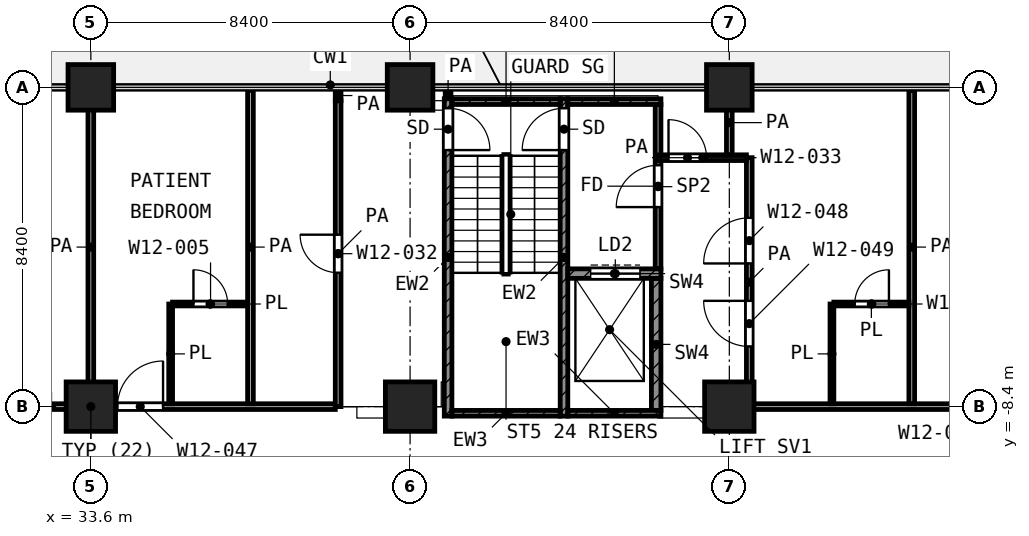
"""IFC4 building model, lengths in metres.
Left out: names, types, materials, properties, quantities, classifications, styles, units other than length and angle.
Written with IfcOpenShell. Run it as: python <this file> out.ifc"""

import sys

from ifc_helpers import new_model, si_unit, direction, frame, frame_2d, origin, origin_2d, place, context, subcontext, project, spatial, rectangle, extrude, element, fill, save


model = new_model("IFC4")
c1 = context("Model", 3, precision=1e-05, world=origin(), true_north=direction((0.0, 1.0)))
c2 = subcontext(c1, "Body", "Model", "MODEL_VIEW")
j1 = project(units=[si_unit("LENGTHUNIT", "METRE"), si_unit("PLANEANGLEUNIT", "RADIAN")], contexts=[c1])
p1 = place(None, origin())
s1 = spatial("IfcSite", under=j1, at=p1, CompositionType="ELEMENT")
p2 = place(p1, origin())
s2 = spatial("IfcBuilding", under=s1, at=p2, CompositionType="ELEMENT")
p3 = place(p2, frame((0.0, 0.0, 56.0)))
s3 = spatial("IfcBuildingStorey", under=s2, at=p3, CompositionType="ELEMENT", Elevation=56.0)
for number, where, z_axis, x_axis in (
    (1, (33.6, 0.0, 0.0), (0.0, 0.0, 1.0), (1.0, 0.0, 0.0)),
    (2, (42.0, 0.0, 0.0), (0.0, 0.0, 1.0), (1.0, 0.0, 0.0)),
    (3, (50.4, 0.0, 0.0), (0.0, 0.0, 1.0), (1.0, 0.0, 0.0)),
):
    element("IfcColumn", number, at=place(p3, frame(where, z_axis=z_axis, x_axis=x_axis)), inside=s3, PredefinedType="COLUMN", context=c2, shape_type="SweptSolid", body=[
        extrude(rectangle(XDim=1.2, YDim=1.2, at=origin_2d()), origin(), (0.0, 0.0, 1.0), 4.2),
    ])
for number, where, z_axis, x_axis in (
    (4, (33.6, -8.4, 0.0), (0.0, 0.0, 1.0), (1.0, 0.0, 0.0)),
    (5, (42.0, -8.4, 0.0), (0.0, 0.0, 1.0), (1.0, 0.0, 0.0)),
    (6, (50.4, -8.4, 0.0), (0.0, 0.0, 1.0), (1.0, 0.0, 0.0)),
):
    element("IfcColumn", number, at=place(p3, frame(where, z_axis=z_axis, x_axis=x_axis)), inside=s3, PredefinedType="COLUMN", context=c2, shape_type="SweptSolid", body=[
        extrude(rectangle(XDim=1.3, YDim=1.3, at=origin_2d()), origin(), (0.0, 0.0, 1.0), 4.2),
    ])
p4 = place(p3, frame((43.0, -8.65, 0.0), z_axis=(0.0, 0.0, 1.0), x_axis=(0.0, 1.0, 0.0)))
e7 = element("IfcWall", 7, at=p4, inside=s3, PredefinedType="SHEAR", context=c2, shape_type="SweptSolid", body=[
    extrude(rectangle(XDim=8.35, YDim=0.2, at=frame_2d((4.175, 0.0))), origin(), (0.0, 0.0, 1.0), 3.9),
])
p5 = place(p4, frame((7.0, 0.0, 0.0)))
e8 = element("IfcOpeningElement", 8, at=p5, cuts=e7, PredefinedType="OPENING", context=c2, shape_type="SweptSolid", body=[
    extrude(rectangle(XDim=1.1, YDim=2.1, at=frame_2d((0.55, 1.05))), frame((0.0, 0.11, 0.0), z_axis=(0.0, -1.0, 0.0), x_axis=(1.0, 0.0, 0.0)), (0.0, 0.0, 1.0), 0.22),
])
p6 = place(p3, frame((46.05, -8.65, 0.0), z_axis=(0.0, 0.0, 1.0), x_axis=(0.0, 1.0, 0.0)))
e9 = element("IfcWall", 9, at=p6, inside=s3, PredefinedType="SHEAR", context=c2, shape_type="SweptSolid", body=[
    extrude(rectangle(XDim=8.35, YDim=0.2, at=frame_2d((4.175, 0.0))), origin(), (0.0, 0.0, 1.0), 3.9),
])
p7 = place(p6, frame((7.0, 0.0, 0.0)))
e10 = element("IfcOpeningElement", 10, at=p7, cuts=e9, PredefinedType="OPENING", context=c2, shape_type="SweptSolid", body=[
    extrude(rectangle(XDim=1.1, YDim=2.1, at=frame_2d((0.55, 1.05))), frame((0.0, 0.11, 0.0), z_axis=(0.0, -1.0, 0.0), x_axis=(1.0, 0.0, 0.0)), (0.0, 0.0, 1.0), 0.22),
])
p8 = place(p3, frame((43.1, -0.375, 0.0), z_axis=(0.0, 0.0, 1.0), x_axis=(1.0, 0.0, 0.0)))
e11 = element("IfcWall", 11, at=p8, inside=s3, PredefinedType="SHEAR", context=c2, shape_type="SweptSolid", body=[
    extrude(rectangle(XDim=2.85, YDim=0.15, at=frame_2d((1.425, 0.0))), origin(), (0.0, 0.0, 1.0), 3.9),
])
p9 = place(p3, frame((46.15, -0.375, 0.0), z_axis=(0.0, 0.0, 1.0), x_axis=(1.0, 0.0, 0.0)))
e12 = element("IfcWall", 12, at=p9, inside=s3, PredefinedType="SHEAR", context=c2, shape_type="SweptSolid", body=[
    extrude(rectangle(XDim=2.45, YDim=0.15, at=frame_2d((1.225, 0.0))), origin(), (0.0, 0.0, 1.0), 3.9),
])
p10 = place(p3, frame((43.1, -8.575, 0.0), z_axis=(0.0, 0.0, 1.0), x_axis=(1.0, 0.0, 0.0)))
e13 = element("IfcWall", 13, at=p10, inside=s3, PredefinedType="SHEAR", context=c2, shape_type="SweptSolid", body=[
    extrude(rectangle(XDim=2.85, YDim=0.15, at=frame_2d((1.425, 0.0))), origin(), (0.0, 0.0, 1.0), 3.9),
])
p11 = place(p3, frame((46.15, -8.575, 0.0), z_axis=(0.0, 0.0, 1.0), x_axis=(1.0, 0.0, 0.0)))
e14 = element("IfcWall", 14, at=p11, inside=s3, PredefinedType="SHEAR", context=c2, shape_type="SweptSolid", body=[
    extrude(rectangle(XDim=2.45, YDim=0.15, at=frame_2d((1.225, 0.0))), origin(), (0.0, 0.0, 1.0), 3.9),
])
p12 = place(p3, frame((46.15, -4.9, 0.0), z_axis=(0.0, 0.0, 1.0), x_axis=(1.0, 0.0, 0.0)))
e15 = element("IfcWall", 15, at=p12, inside=s3, PredefinedType="SHEAR", context=c2, shape_type="SweptSolid", body=[
    extrude(rectangle(XDim=2.45, YDim=0.25, at=frame_2d((1.225, 0.0))), origin(), (0.0, 0.0, 1.0), 3.9),
])
p13 = place(p12, frame((0.6, 0.0, 0.0)))
e16 = element("IfcOpeningElement", 16, at=p13, cuts=e15, PredefinedType="OPENING", context=c2, shape_type="SweptSolid", body=[
    extrude(rectangle(XDim=1.3, YDim=2.1, at=frame_2d((0.65, 1.05))), frame((0.0, 0.135, 0.0), z_axis=(0.0, -1.0, 0.0), x_axis=(1.0, 0.0, 0.0)), (0.0, 0.0, 1.0), 0.27),
])
p14 = place(p3, frame((48.475, -8.5, 0.0), z_axis=(0.0, 0.0, 1.0), x_axis=(0.0, 1.0, 0.0)))
e17 = element("IfcWall", 17, at=p14, inside=s3, PredefinedType="SHEAR", context=c2, shape_type="SweptSolid", body=[
    extrude(rectangle(XDim=3.475, YDim=0.25, at=frame_2d((1.738, 0.0))), origin(), (0.0, 0.0, 1.0), 3.9),
])
p15 = place(p3, frame((48.525, -4.775, 0.0), z_axis=(0.0, 0.0, 1.0), x_axis=(0.0, 1.0, 0.0)))
e18 = element("IfcWall", 18, at=p15, inside=s3, PredefinedType="PARTITIONING", context=c2, shape_type="SweptSolid", body=[
    extrude(rectangle(XDim=4.325, YDim=0.15, at=frame_2d((2.163, 0.0))), origin(), (0.0, 0.0, 1.0), 3.9),
])
p16 = place(p15, frame((1.625, 0.0, 0.0)))
e19 = element("IfcOpeningElement", 19, at=p16, cuts=e18, PredefinedType="OPENING", context=c2, shape_type="SweptSolid", body=[
    extrude(rectangle(XDim=1.1, YDim=2.1, at=frame_2d((0.55, 1.05))), frame((0.0, 0.085, 0.0), z_axis=(0.0, -1.0, 0.0), x_axis=(1.0, 0.0, 0.0)), (0.0, 0.0, 1.0), 0.17),
])
p17 = place(p3, frame((35.75, -5.7, 0.0), z_axis=(0.0, 0.0, 1.0), x_axis=(1.0, 0.0, 0.0)))
e20 = element("IfcWall", 20, at=p17, inside=s3, PredefinedType="PARTITIONING", context=c2, shape_type="SweptSolid", body=[
    extrude(rectangle(XDim=1.975, YDim=0.1, at=frame_2d((0.988, 0.0))), origin(), (0.0, 0.0, 1.0), 3.9),
])
p18 = place(p17, frame((0.55, 0.0, 0.0)))
e21 = element("IfcOpeningElement", 21, at=p18, cuts=e20, PredefinedType="OPENING", context=c2, shape_type="SweptSolid", body=[
    extrude(rectangle(XDim=0.9, YDim=2.1, at=frame_2d((0.45, 1.05))), frame((0.0, 0.06, 0.0), z_axis=(0.0, -1.0, 0.0), x_axis=(1.0, 0.0, 0.0)), (0.0, 0.0, 1.0), 0.12),
])
p19 = place(p3, frame((53.15, -5.7, 0.0), z_axis=(0.0, 0.0, 1.0), x_axis=(1.0, 0.0, 0.0)))
e22 = element("IfcWall", 22, at=p19, inside=s3, PredefinedType="PARTITIONING", context=c2, shape_type="SweptSolid", body=[
    extrude(rectangle(XDim=1.975, YDim=0.1, at=frame_2d((0.988, 0.0))), origin(), (0.0, 0.0, 1.0), 3.9),
])
p20 = place(p19, frame((0.55, 0.0, 0.0)))
e23 = element("IfcOpeningElement", 23, at=p20, cuts=e22, PredefinedType="OPENING", context=c2, shape_type="SweptSolid", body=[
    extrude(rectangle(XDim=0.9, YDim=2.1, at=frame_2d((0.45, 1.05))), frame((0.0, 0.06, 0.0), z_axis=(0.0, -1.0, 0.0), x_axis=(1.0, 0.0, 0.0)), (0.0, 0.0, 1.0), 0.12),
])
for number, where, z_axis, x_axis in (
    (24, (35.7, -8.325, 0.0), (0.0, 0.0, 1.0), (0.0, 1.0, 0.0)),
    (25, (53.1, -8.325, 0.0), (0.0, 0.0, 1.0), (0.0, 1.0, 0.0)),
):
    element("IfcWall", number, at=place(p3, frame(where, z_axis=z_axis, x_axis=x_axis)), inside=s3, PredefinedType="PARTITIONING", context=c2, shape_type="SweptSolid", body=[
        extrude(rectangle(XDim=2.625, YDim=0.1, at=frame_2d((1.312, 0.0))), origin(), (0.0, 0.0, 1.0), 3.9),
    ])
p21 = place(p3, frame((25.1, -8.4, 0.0), z_axis=(0.0, 0.0, 1.0), x_axis=(1.0, 0.0, 0.0)))
e26 = element("IfcWall", 26, at=p21, inside=s3, PredefinedType="PARTITIONING", context=c2, shape_type="SweptSolid", body=[
    extrude(rectangle(XDim=14.932, YDim=0.15, at=frame_2d((7.466, 0.0))), origin(), (0.0, 0.0, 1.0), 3.9),
])
p22 = place(p21, frame((3.55, 0.0, 0.0)))
e27 = element("IfcOpeningElement", 27, at=p22, cuts=e26, PredefinedType="OPENING", context=c2, shape_type="SweptSolid", body=[
    extrude(rectangle(XDim=1.5, YDim=2.1, at=frame_2d((0.75, 1.05))), frame((0.0, 0.085, 0.0), z_axis=(0.0, -1.0, 0.0), x_axis=(1.0, 0.0, 0.0)), (0.0, 0.0, 1.0), 0.17),
])
p23 = place(p21, frame((9.2, 0.0, 0.0)))
e28 = element("IfcOpeningElement", 28, at=p23, cuts=e26, PredefinedType="OPENING", context=c2, shape_type="SweptSolid", body=[
    extrude(rectangle(XDim=1.2, YDim=2.1, at=frame_2d((0.6, 1.05))), frame((0.0, 0.085, 0.0), z_axis=(0.0, -1.0, 0.0), x_axis=(1.0, 0.0, 0.0)), (0.0, 0.0, 1.0), 0.17),
])
p24 = place(p3, frame((51.0, -8.4, 0.0), z_axis=(0.0, 0.0, 1.0), x_axis=(1.0, 0.0, 0.0)))
e29 = element("IfcWall", 29, at=p24, inside=s3, PredefinedType="PARTITIONING", context=c2, shape_type="SweptSolid", body=[
    extrude(rectangle(XDim=23.95, YDim=0.15, at=frame_2d((11.975, 0.0))), origin(), (0.0, 0.0, 1.0), 3.9),
])
p25 = place(p24, frame((5.4, 0.0, 0.0)))
e30 = element("IfcOpeningElement", 30, at=p25, cuts=e29, PredefinedType="OPENING", context=c2, shape_type="SweptSolid", body=[
    extrude(rectangle(XDim=1.2, YDim=2.1, at=frame_2d((0.6, 1.05))), frame((0.0, 0.085, 0.0), z_axis=(0.0, -1.0, 0.0), x_axis=(1.0, 0.0, 0.0)), (0.0, 0.0, 1.0), 0.17),
])
p26 = place(p24, frame((8.5, 0.0, 0.0)))
e31 = element("IfcOpeningElement", 31, at=p26, cuts=e29, PredefinedType="OPENING", context=c2, shape_type="SweptSolid", body=[
    extrude(rectangle(XDim=0.9, YDim=2.1, at=frame_2d((0.45, 1.05))), frame((0.0, 0.085, 0.0), z_axis=(0.0, -1.0, 0.0), x_axis=(1.0, 0.0, 0.0)), (0.0, 0.0, 1.0), 0.17),
])
p27 = place(p24, frame((14.0, 0.0, 0.0)))
e32 = element("IfcOpeningElement", 32, at=p27, cuts=e29, PredefinedType="OPENING", context=c2, shape_type="SweptSolid", body=[
    extrude(rectangle(XDim=1.2, YDim=2.1, at=frame_2d((0.6, 1.05))), frame((0.0, 0.085, 0.0), z_axis=(0.0, -1.0, 0.0), x_axis=(1.0, 0.0, 0.0)), (0.0, 0.0, 1.0), 0.17),
])
p28 = place(p24, frame((16.9, 0.0, 0.0)))
e33 = element("IfcOpeningElement", 33, at=p28, cuts=e29, PredefinedType="OPENING", context=c2, shape_type="SweptSolid", body=[
    extrude(rectangle(XDim=1.2, YDim=2.1, at=frame_2d((0.6, 1.05))), frame((0.0, 0.085, 0.0), z_axis=(0.0, -1.0, 0.0), x_axis=(1.0, 0.0, 0.0)), (0.0, 0.0, 1.0), 0.17),
])
p29 = place(p24, frame((21.825, 0.0, 0.0)))
e34 = element("IfcOpeningElement", 34, at=p29, cuts=e29, PredefinedType="OPENING", context=c2, shape_type="SweptSolid", body=[
    extrude(rectangle(XDim=1.0, YDim=2.1, at=frame_2d((0.5, 1.05))), frame((0.0, 0.085, 0.0), z_axis=(0.0, -1.0, 0.0), x_axis=(1.0, 0.0, 0.0)), (0.0, 0.0, 1.0), 0.17),
])
p30 = place(p3, frame((48.55, -1.85, 0.0), z_axis=(0.0, 0.0, 1.0), x_axis=(1.0, 0.0, 0.0)))
e35 = element("IfcWall", 35, at=p30, inside=s3, PredefinedType="PARTITIONING", context=c2, shape_type="SweptSolid", body=[
    extrude(rectangle(XDim=2.3, YDim=0.15, at=frame_2d((1.15, 0.0))), origin(), (0.0, 0.0, 1.0), 3.9),
])
p31 = place(p30, frame((0.25, 0.0, 0.0)))
e36 = element("IfcOpeningElement", 36, at=p31, cuts=e35, PredefinedType="OPENING", context=c2, shape_type="SweptSolid", body=[
    extrude(rectangle(XDim=1.0, YDim=2.1, at=frame_2d((0.5, 1.05))), frame((0.0, 0.085, 0.0), z_axis=(0.0, -1.0, 0.0), x_axis=(1.0, 0.0, 0.0)), (0.0, 0.0, 1.0), 0.17),
])
for number, where, z_axis, x_axis in (
    (37, (33.6, -8.325, 0.0), (0.0, 0.0, 1.0), (0.0, 1.0, 0.0)),
    (38, (37.8, -8.325, 0.0), (0.0, 0.0, 1.0), (0.0, 1.0, 0.0)),
):
    element("IfcWall", number, at=place(p3, frame(where, z_axis=z_axis, x_axis=x_axis)), inside=s3, PredefinedType="PARTITIONING", context=c2, shape_type="SweptSolid", body=[
        extrude(rectangle(XDim=8.245, YDim=0.15, at=frame_2d((4.123, 0.0))), origin(), (0.0, 0.0, 1.0), 3.9),
    ])
p32 = place(p3, frame((40.107, -8.4, 0.0), z_axis=(0.0, 0.0, 1.0), x_axis=(0.0, 1.0, 0.0)))
e39 = element("IfcWall", 39, at=p32, inside=s3, PredefinedType="PARTITIONING", context=c2, shape_type="SweptSolid", body=[
    extrude(rectangle(XDim=8.048, YDim=0.15, at=frame_2d((4.024, 0.0))), origin(), (0.0, 0.0, 1.0), 3.9),
])
p33 = place(p32, frame((3.524, 0.0, 0.0)))
e40 = element("IfcOpeningElement", 40, at=p33, cuts=e39, PredefinedType="OPENING", context=c2, shape_type="SweptSolid", body=[
    extrude(rectangle(XDim=1.0, YDim=2.1, at=frame_2d((0.5, 1.05))), frame((0.0, 0.085, 0.0), z_axis=(0.0, -1.0, 0.0), x_axis=(1.0, 0.0, 0.0)), (0.0, 0.0, 1.0), 0.17),
])
p34 = place(p3, frame((40.107, -0.35, 0.0), z_axis=(0.0, 0.0, 1.0), x_axis=(0.0, 1.0, 0.0)))
e41 = element("IfcWall", 41, at=p34, inside=s3, PredefinedType="PARTITIONING", context=c2, shape_type="SweptSolid", body=[
    extrude(rectangle(XDim=0.27, YDim=0.15, at=frame_2d((0.135, 0.0))), origin(), (0.0, 0.0, 1.0), 3.9),
])
p35 = place(p3, frame((43.0, -0.27, 0.0), z_axis=(0.0, 0.0, 1.0), x_axis=(0.0, 1.0, 0.0)))
e42 = element("IfcWall", 42, at=p35, inside=s3, PredefinedType="PARTITIONING", context=c2, shape_type="SweptSolid", body=[
    extrude(rectangle(XDim=0.19, YDim=0.15, at=frame_2d((0.095, 0.0))), origin(), (0.0, 0.0, 1.0), 3.9),
])
p36 = place(p3, frame((50.4, -1.775, 0.0), z_axis=(0.0, 0.0, 1.0), x_axis=(0.0, 1.0, 0.0)))
e43 = element("IfcWall", 43, at=p36, inside=s3, PredefinedType="PARTITIONING", context=c2, shape_type="SweptSolid", body=[
    extrude(rectangle(XDim=1.695, YDim=0.15, at=frame_2d((0.847, 0.0))), origin(), (0.0, 0.0, 1.0), 3.9),
])
p37 = place(p3, frame((50.925, -8.4, 0.0), z_axis=(0.0, 0.0, 1.0), x_axis=(0.0, 1.0, 0.0)))
e44 = element("IfcWall", 44, at=p37, inside=s3, PredefinedType="PARTITIONING", context=c2, shape_type="SweptSolid", body=[
    extrude(rectangle(XDim=6.55, YDim=0.15, at=frame_2d((3.275, 0.0))), origin(), (0.0, 0.0, 1.0), 3.9),
])
p38 = place(p37, frame((3.767, 0.0, 0.0)))
e45 = element("IfcOpeningElement", 45, at=p38, cuts=e44, PredefinedType="OPENING", context=c2, shape_type="SweptSolid", body=[
    extrude(rectangle(XDim=1.2, YDim=2.1, at=frame_2d((0.6, 1.05))), frame((0.0, 0.085, 0.0), z_axis=(0.0, -1.0, 0.0), x_axis=(1.0, 0.0, 0.0)), (0.0, 0.0, 1.0), 0.17),
])
p39 = place(p37, frame((1.583, 0.0, 0.0)))
e46 = element("IfcOpeningElement", 46, at=p39, cuts=e44, PredefinedType="OPENING", context=c2, shape_type="SweptSolid", body=[
    extrude(rectangle(XDim=1.2, YDim=2.1, at=frame_2d((0.6, 1.05))), frame((0.0, 0.085, 0.0), z_axis=(0.0, -1.0, 0.0), x_axis=(1.0, 0.0, 0.0)), (0.0, 0.0, 1.0), 0.17),
])
p40 = place(p3, frame((55.2, -8.325, 0.0), z_axis=(0.0, 0.0, 1.0), x_axis=(0.0, 1.0, 0.0)))
e47 = element("IfcWall", 47, at=p40, inside=s3, PredefinedType="PARTITIONING", context=c2, shape_type="SweptSolid", body=[
    extrude(rectangle(XDim=8.245, YDim=0.15, at=frame_2d((4.123, 0.0))), origin(), (0.0, 0.0, 1.0), 3.9),
])
p41 = place(p5, frame((1.1, 0.0, 0.0), z_axis=(0.0, 0.0, 1.0), x_axis=(-1.0, 0.0, 0.0)))
e48 = element("IfcDoor", 48, at=p41, inside=s3, OperationType="SINGLE_SWING_LEFT", PredefinedType="DOOR", context=c2, shape_type="SweptSolid", body=[
    extrude(rectangle(XDim=1.1, YDim=2.1, at=frame_2d((0.55, 1.05))), frame((0.0, 0.025, 0.0), z_axis=(0.0, -1.0, 0.0), x_axis=(1.0, 0.0, 0.0)), (0.0, 0.0, 1.0), 0.05),
])
fill(e8, e48)
p42 = place(p7, origin())
e49 = element("IfcDoor", 49, at=p42, inside=s3, OperationType="SINGLE_SWING_LEFT", PredefinedType="DOOR", context=c2, shape_type="SweptSolid", body=[
    extrude(rectangle(XDim=1.1, YDim=2.1, at=frame_2d((0.55, 1.05))), frame((0.0, 0.025, 0.0), z_axis=(0.0, -1.0, 0.0), x_axis=(1.0, 0.0, 0.0)), (0.0, 0.0, 1.0), 0.05),
])
fill(e10, e49)
p43 = place(p13, origin())
e50 = element("IfcDoor", 50, at=p43, inside=s3, OperationType="DOUBLE_DOOR_SLIDING", PredefinedType="DOOR", context=c2, shape_type="SweptSolid", body=[
    extrude(rectangle(XDim=1.3, YDim=2.1, at=frame_2d((0.65, 1.05))), frame((0.0, 0.025, 0.0), z_axis=(0.0, -1.0, 0.0), x_axis=(1.0, 0.0, 0.0)), (0.0, 0.0, 1.0), 0.05),
])
fill(e16, e50)
p44 = place(p16, origin())
e51 = element("IfcDoor", 51, at=p44, inside=s3, OperationType="SINGLE_SWING_LEFT", PredefinedType="DOOR", context=c2, shape_type="SweptSolid", body=[
    extrude(rectangle(XDim=1.1, YDim=2.1, at=frame_2d((0.55, 1.05))), frame((0.0, 0.025, 0.0), z_axis=(0.0, -1.0, 0.0), x_axis=(1.0, 0.0, 0.0)), (0.0, 0.0, 1.0), 0.05),
])
fill(e19, e51)
p45 = place(p23, origin())
e52 = element("IfcDoor", 52, at=p45, inside=s3, OperationType="SINGLE_SWING_RIGHT", PredefinedType="DOOR", context=c2, shape_type="SweptSolid", body=[
    extrude(rectangle(XDim=1.2, YDim=2.1, at=frame_2d((0.6, 1.05))), frame((0.0, 0.025, 0.0), z_axis=(0.0, -1.0, 0.0), x_axis=(1.0, 0.0, 0.0)), (0.0, 0.0, 1.0), 0.05),
])
fill(e28, e52)
p46 = place(p18, origin())
e53 = element("IfcDoor", 53, at=p46, inside=s3, OperationType="SINGLE_SWING_LEFT", PredefinedType="DOOR", context=c2, shape_type="SweptSolid", body=[
    extrude(rectangle(XDim=0.9, YDim=2.1, at=frame_2d((0.45, 1.05))), frame((0.0, 0.025, 0.0), z_axis=(0.0, -1.0, 0.0), x_axis=(1.0, 0.0, 0.0)), (0.0, 0.0, 1.0), 0.05),
])
fill(e21, e53)
p47 = place(p33, origin())
e54 = element("IfcDoor", 54, at=p47, inside=s3, OperationType="SINGLE_SWING_RIGHT", PredefinedType="DOOR", context=c2, shape_type="SweptSolid", body=[
    extrude(rectangle(XDim=1.0, YDim=2.1, at=frame_2d((0.5, 1.05))), frame((0.0, 0.025, 0.0), z_axis=(0.0, -1.0, 0.0), x_axis=(1.0, 0.0, 0.0)), (0.0, 0.0, 1.0), 0.05),
])
fill(e40, e54)
p48 = place(p31, origin())
e55 = element("IfcDoor", 55, at=p48, inside=s3, OperationType="SINGLE_SWING_LEFT", PredefinedType="DOOR", context=c2, shape_type="SweptSolid", body=[
    extrude(rectangle(XDim=1.0, YDim=2.1, at=frame_2d((0.5, 1.05))), frame((0.0, 0.025, 0.0), z_axis=(0.0, -1.0, 0.0), x_axis=(1.0, 0.0, 0.0)), (0.0, 0.0, 1.0), 0.05),
])
fill(e36, e55)
p49 = place(p38, origin())
e56 = element("IfcDoor", 56, at=p49, inside=s3, OperationType="SINGLE_SWING_LEFT", PredefinedType="DOOR", context=c2, shape_type="SweptSolid", body=[
    extrude(rectangle(XDim=1.2, YDim=2.1, at=frame_2d((0.6, 1.05))), frame((0.0, 0.025, 0.0), z_axis=(0.0, -1.0, 0.0), x_axis=(1.0, 0.0, 0.0)), (0.0, 0.0, 1.0), 0.05),
])
fill(e45, e56)
p50 = place(p39, origin())
e57 = element("IfcDoor", 57, at=p50, inside=s3, OperationType="SINGLE_SWING_RIGHT", PredefinedType="DOOR", context=c2, shape_type="SweptSolid", body=[
    extrude(rectangle(XDim=1.2, YDim=2.1, at=frame_2d((0.6, 1.05))), frame((0.0, 0.025, 0.0), z_axis=(0.0, -1.0, 0.0), x_axis=(1.0, 0.0, 0.0)), (0.0, 0.0, 1.0), 0.05),
])
fill(e46, e57)
p51 = place(p20, origin())
e58 = element("IfcDoor", 58, at=p51, inside=s3, OperationType="SINGLE_SWING_RIGHT", PredefinedType="DOOR", context=c2, shape_type="SweptSolid", body=[
    extrude(rectangle(XDim=0.9, YDim=2.1, at=frame_2d((0.45, 1.05))), frame((0.0, 0.025, 0.0), z_axis=(0.0, -1.0, 0.0), x_axis=(1.0, 0.0, 0.0)), (0.0, 0.0, 1.0), 0.05),
])
fill(e23, e58)
save(model, sys.argv[1])
